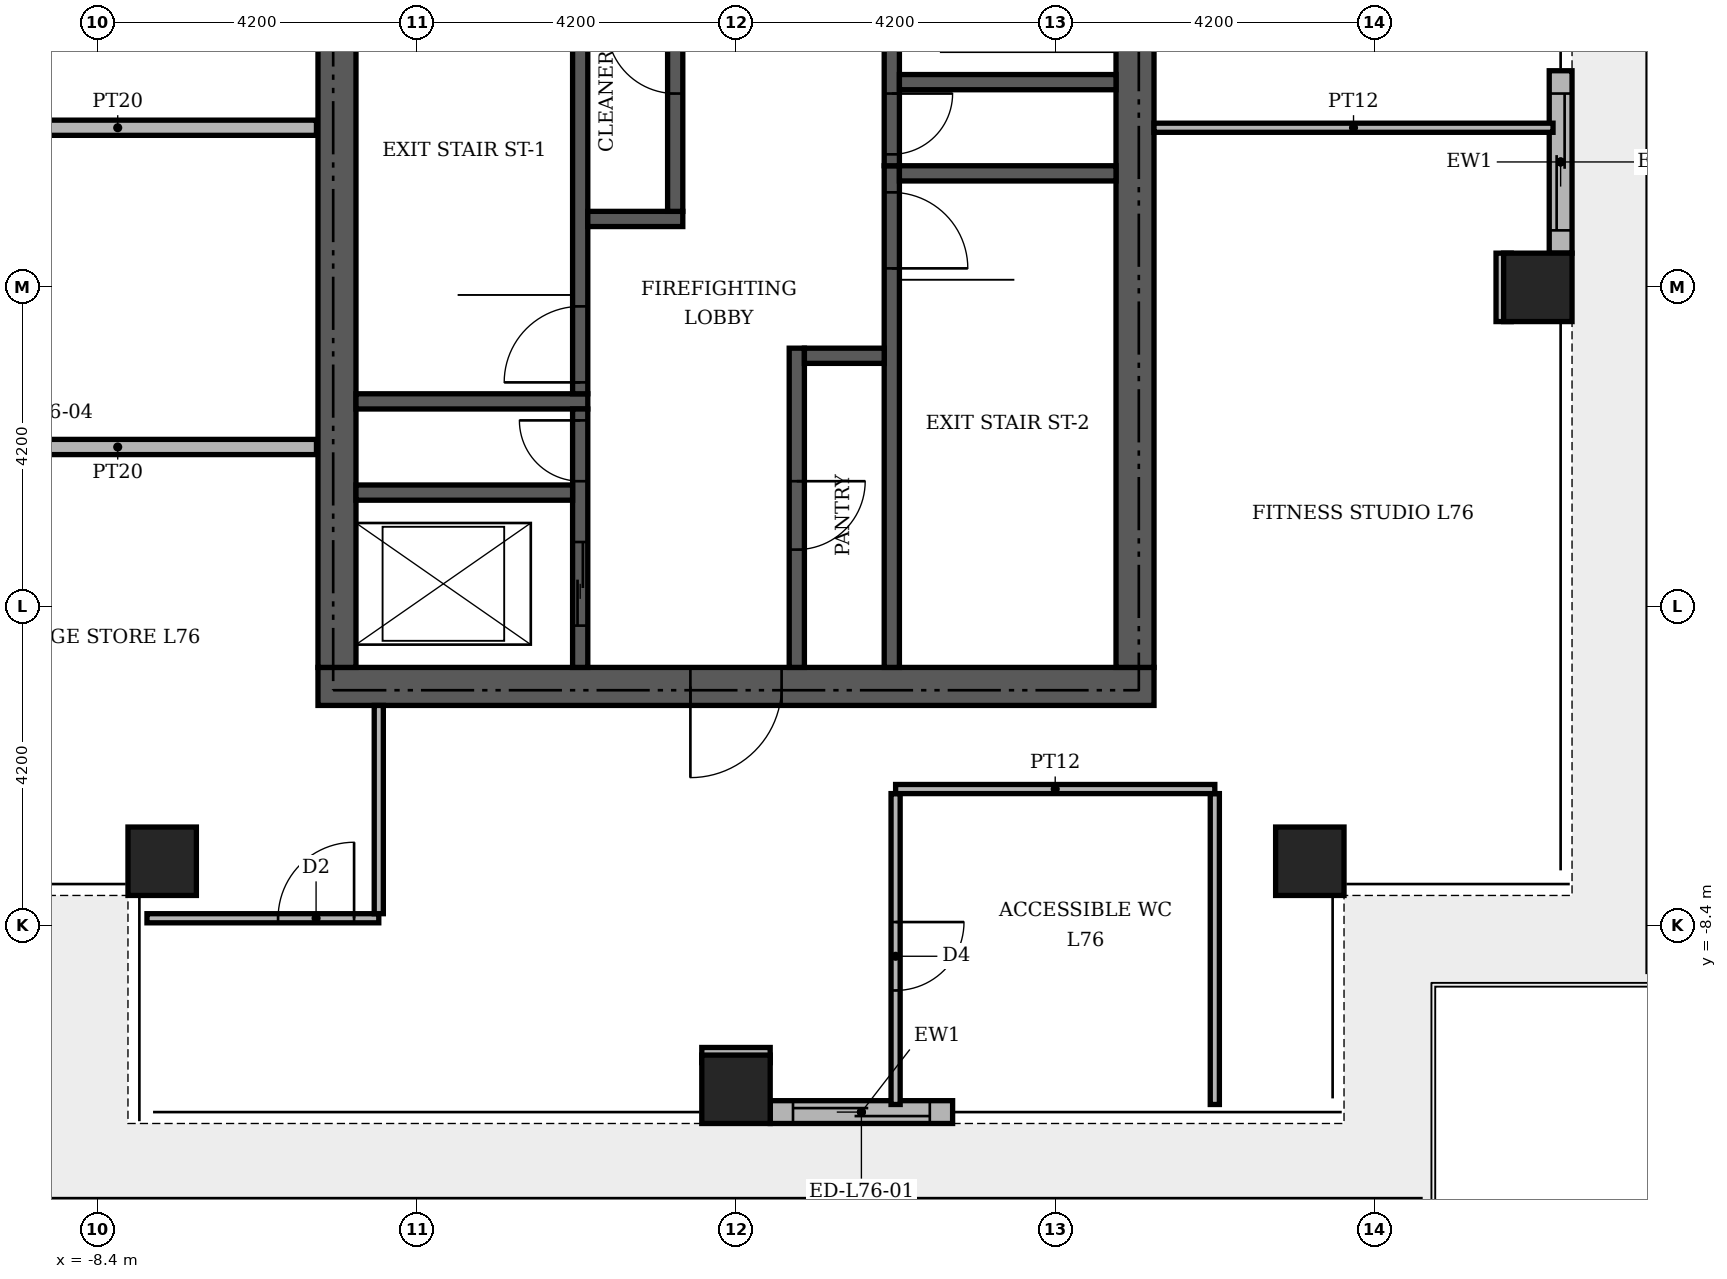
"""IFC4 building model, lengths in metres.
Left out: names, types, materials, properties, quantities, classifications, styles, units other than length and angle.
Written with IfcOpenShell. Run it as: python <this file> out.ifc"""

import sys

from ifc_helpers import new_model, si_unit, direction, frame, frame_2d, origin, origin_2d, place, context, subcontext, project, spatial, rectangle, extrude, element, fill, save


model = new_model("IFC4")
c1 = context("Model", 3, precision=1e-05, world=origin(), true_north=direction((0.0, 1.0)))
c2 = subcontext(c1, "Body", "Model", "MODEL_VIEW")
j1 = project(units=[si_unit("LENGTHUNIT", "METRE"), si_unit("PLANEANGLEUNIT", "RADIAN")], contexts=[c1])
p1 = place(None, origin())
s1 = spatial("IfcSite", under=j1, at=p1, CompositionType="ELEMENT")
p2 = place(p1, origin())
s2 = spatial("IfcBuilding", under=s1, at=p2, CompositionType="ELEMENT")
p3 = place(p2, frame((0.0, 0.0, 316.2)))
s3 = spatial("IfcBuildingStorey", under=s2, at=p3, CompositionType="ELEMENT", Elevation=316.2)
p4 = place(p3, frame((-5.5, -5.25, 0.0), z_axis=(0.0, 0.0, 1.0), x_axis=(1.0, 0.0, 0.0)))
e1 = element("IfcWall", 1, at=p4, inside=s3, PredefinedType="SHEAR", context=c2, shape_type="SweptSolid", body=[
    extrude(rectangle(XDim=11.0, YDim=0.5, at=frame_2d((5.5, 0.0))), origin(), (0.0, 0.0, 1.0), 5.0),
])
p5 = place(p4, frame((4.9, 0.0, 0.0)))
e2 = element("IfcOpeningElement", 2, at=p5, cuts=e1, PredefinedType="OPENING", context=c2, shape_type="SweptSolid", body=[
    extrude(rectangle(XDim=1.2, YDim=2.1, at=frame_2d((0.6, 1.05))), frame((0.0, 0.26, 0.0), z_axis=(0.0, -1.0, 0.0), x_axis=(1.0, 0.0, 0.0)), (0.0, 0.0, 1.0), 0.52),
])
for number, where, z_axis, x_axis in (
    (3, (-5.25, -5.0, 0.0), (0.0, 0.0, 1.0), (0.0, 1.0, 0.0)),
    (4, (5.25, -5.0, 0.0), (0.0, 0.0, 1.0), (0.0, 1.0, 0.0)),
):
    element("IfcWall", number, at=place(p3, frame(where, z_axis=z_axis, x_axis=x_axis)), inside=s3, PredefinedType="SHEAR", context=c2, shape_type="SweptSolid", body=[
        extrude(rectangle(XDim=10.5, YDim=0.5, at=frame_2d((5.25, 0.0))), origin(), (0.0, 0.0, 1.0), 5.0),
    ])
p6 = place(p3, frame((2.05, -5.0, 0.0), z_axis=(0.0, 0.0, 1.0), x_axis=(0.0, 1.0, 0.0)))
e5 = element("IfcWall", 5, at=p6, inside=s3, PredefinedType="SHEAR", context=c2, shape_type="SweptSolid", body=[
    extrude(rectangle(XDim=6.6, YDim=0.2, at=frame_2d((3.3, 0.0))), origin(), (0.0, 0.0, 1.0), 5.0),
])
p7 = place(p6, frame((5.25, 0.0, 0.0)))
e6 = element("IfcOpeningElement", 6, at=p7, cuts=e5, PredefinedType="OPENING", context=c2, shape_type="SweptSolid", body=[
    extrude(rectangle(XDim=1.0, YDim=2.1, at=frame_2d((0.5, 1.05))), frame((0.0, 0.11, 0.0), z_axis=(0.0, -1.0, 0.0), x_axis=(1.0, 0.0, 0.0)), (0.0, 0.0, 1.0), 0.22),
])
p8 = place(p3, frame((-5.0, -1.5, 0.0), z_axis=(0.0, 0.0, 1.0), x_axis=(1.0, 0.0, 0.0)))
e7 = element("IfcWall", 7, at=p8, inside=s3, PredefinedType="SHEAR", context=c2, shape_type="SweptSolid", body=[
    extrude(rectangle(XDim=3.05, YDim=0.2, at=frame_2d((1.525, 0.0))), origin(), (0.0, 0.0, 1.0), 5.0),
])
p9 = place(p3, frame((-2.05, -1.4, 0.0), z_axis=(0.0, 0.0, 1.0), x_axis=(0.0, 1.0, 0.0)))
e8 = element("IfcWall", 8, at=p9, inside=s3, PredefinedType="SHEAR", context=c2, shape_type="SweptSolid", body=[
    extrude(rectangle(XDim=6.4, YDim=0.2, at=frame_2d((3.2, 0.0))), origin(), (0.0, 0.0, 1.0), 5.0),
])
p10 = place(p9, frame((0.15, 0.0, 0.0)))
e9 = element("IfcOpeningElement", 9, at=p10, cuts=e8, PredefinedType="OPENING", context=c2, shape_type="SweptSolid", body=[
    extrude(rectangle(XDim=1.0, YDim=2.1, at=frame_2d((0.5, 1.05))), frame((0.0, 0.11, 0.0), z_axis=(0.0, -1.0, 0.0), x_axis=(1.0, 0.0, 0.0)), (0.0, 0.0, 1.0), 0.22),
])
p11 = place(p3, frame((2.15, 1.5, 0.0), z_axis=(0.0, 0.0, 1.0), x_axis=(1.0, 0.0, 0.0)))
e10 = element("IfcWall", 10, at=p11, inside=s3, PredefinedType="SHEAR", context=c2, shape_type="SweptSolid", body=[
    extrude(rectangle(XDim=2.85, YDim=0.2, at=frame_2d((1.425, 0.0))), origin(), (0.0, 0.0, 1.0), 5.0),
])
p12 = place(p3, frame((-2.05, -5.0, 0.0), z_axis=(0.0, 0.0, 1.0), x_axis=(0.0, 1.0, 0.0)))
e11 = element("IfcWall", 11, at=p12, inside=s3, PredefinedType="SHEAR", context=c2, shape_type="SweptSolid", body=[
    extrude(rectangle(XDim=3.4, YDim=0.2, at=frame_2d((1.7, 0.0))), origin(), (0.0, 0.0, 1.0), 5.0),
])
p13 = place(p12, frame((0.55, 0.0, 0.0)))
e12 = element("IfcOpeningElement", 12, at=p13, cuts=e11, PredefinedType="OPENING", context=c2, shape_type="SweptSolid", body=[
    extrude(rectangle(XDim=1.1, YDim=2.1, at=frame_2d((0.55, 1.05))), frame((0.0, 0.11, 0.0), z_axis=(0.0, -1.0, 0.0), x_axis=(1.0, 0.0, 0.0)), (0.0, 0.0, 1.0), 0.22),
])
p14 = place(p12, frame((2.45, 0.0, 0.0)))
e13 = element("IfcOpeningElement", 13, at=p14, cuts=e11, PredefinedType="OPENING", context=c2, shape_type="SweptSolid", body=[
    extrude(rectangle(XDim=0.8, YDim=2.1, at=frame_2d((0.4, 1.05))), frame((0.0, 0.11, 0.0), z_axis=(0.0, -1.0, 0.0), x_axis=(1.0, 0.0, 0.0)), (0.0, 0.0, 1.0), 0.22),
])
p15 = place(p3, frame((0.8, -5.0, 0.0), z_axis=(0.0, 0.0, 1.0), x_axis=(0.0, 1.0, 0.0)))
e14 = element("IfcWall", 14, at=p15, inside=s3, PredefinedType="SHEAR", context=c2, shape_type="SweptSolid", body=[
    extrude(rectangle(XDim=4.2, YDim=0.2, at=frame_2d((2.1, 0.0))), origin(), (0.0, 0.0, 1.0), 5.0),
])
p16 = place(p15, frame((1.55, 0.0, 0.0)))
e15 = element("IfcOpeningElement", 15, at=p16, cuts=e14, PredefinedType="OPENING", context=c2, shape_type="SweptSolid", body=[
    extrude(rectangle(XDim=0.9, YDim=2.1, at=frame_2d((0.45, 1.05))), frame((0.0, 0.11, 0.0), z_axis=(0.0, -1.0, 0.0), x_axis=(1.0, 0.0, 0.0)), (0.0, 0.0, 1.0), 0.22),
])
p17 = place(p3, frame((-5.0, -2.7, 0.0), z_axis=(0.0, 0.0, 1.0), x_axis=(1.0, 0.0, 0.0)))
e16 = element("IfcWall", 16, at=p17, inside=s3, PredefinedType="SHEAR", context=c2, shape_type="SweptSolid", body=[
    extrude(rectangle(XDim=2.85, YDim=0.2, at=frame_2d((1.425, 0.0))), origin(), (0.0, 0.0, 1.0), 5.0),
])
p18 = place(p3, frame((0.9, -0.9, 0.0), z_axis=(0.0, 0.0, 1.0), x_axis=(1.0, 0.0, 0.0)))
e17 = element("IfcWall", 17, at=p18, inside=s3, PredefinedType="SHEAR", context=c2, shape_type="SweptSolid", body=[
    extrude(rectangle(XDim=1.05, YDim=0.2, at=frame_2d((0.525, 0.0))), origin(), (0.0, 0.0, 1.0), 5.0),
])
p19 = place(p3, frame((-1.95, 0.9, 0.0), z_axis=(0.0, 0.0, 1.0), x_axis=(1.0, 0.0, 0.0)))
e18 = element("IfcWall", 18, at=p19, inside=s3, PredefinedType="SHEAR", context=c2, shape_type="SweptSolid", body=[
    extrude(rectangle(XDim=1.25, YDim=0.2, at=frame_2d((0.625, 0.0))), origin(), (0.0, 0.0, 1.0), 5.0),
])
p20 = place(p3, frame((-0.8, 1.0, 0.0), z_axis=(0.0, 0.0, 1.0), x_axis=(0.0, 1.0, 0.0)))
e19 = element("IfcWall", 19, at=p20, inside=s3, PredefinedType="SHEAR", context=c2, shape_type="SweptSolid", body=[
    extrude(rectangle(XDim=4.0, YDim=0.2, at=frame_2d((2.0, 0.0))), origin(), (0.0, 0.0, 1.0), 5.0),
])
p21 = place(p20, frame((1.55, 0.0, 0.0)))
e20 = element("IfcOpeningElement", 20, at=p21, cuts=e19, PredefinedType="OPENING", context=c2, shape_type="SweptSolid", body=[
    extrude(rectangle(XDim=0.9, YDim=2.1, at=frame_2d((0.45, 1.05))), frame((0.0, 0.11, 0.0), z_axis=(0.0, -1.0, 0.0), x_axis=(1.0, 0.0, 0.0)), (0.0, 0.0, 1.0), 0.22),
])
p22 = place(p3, frame((2.05, 1.6, 0.0), z_axis=(0.0, 0.0, 1.0), x_axis=(0.0, 1.0, 0.0)))
e21 = element("IfcWall", 21, at=p22, inside=s3, PredefinedType="SHEAR", context=c2, shape_type="SweptSolid", body=[
    extrude(rectangle(XDim=3.4, YDim=0.2, at=frame_2d((1.7, 0.0))), origin(), (0.0, 0.0, 1.0), 5.0),
])
p23 = place(p22, frame((1.75, 0.0, 0.0)))
e22 = element("IfcOpeningElement", 22, at=p23, cuts=e21, PredefinedType="OPENING", context=c2, shape_type="SweptSolid", body=[
    extrude(rectangle(XDim=1.1, YDim=2.1, at=frame_2d((0.55, 1.05))), frame((0.0, 0.11, 0.0), z_axis=(0.0, -1.0, 0.0), x_axis=(1.0, 0.0, 0.0)), (0.0, 0.0, 1.0), 0.22),
])
p24 = place(p22, frame((0.15, 0.0, 0.0)))
e23 = element("IfcOpeningElement", 23, at=p24, cuts=e21, PredefinedType="OPENING", context=c2, shape_type="SweptSolid", body=[
    extrude(rectangle(XDim=0.8, YDim=2.1, at=frame_2d((0.4, 1.05))), frame((0.0, 0.11, 0.0), z_axis=(0.0, -1.0, 0.0), x_axis=(1.0, 0.0, 0.0)), (0.0, 0.0, 1.0), 0.22),
])
p25 = place(p3, frame((2.15, 2.7, 0.0), z_axis=(0.0, 0.0, 1.0), x_axis=(1.0, 0.0, 0.0)))
e24 = element("IfcWall", 24, at=p25, inside=s3, PredefinedType="SHEAR", context=c2, shape_type="SweptSolid", body=[
    extrude(rectangle(XDim=2.85, YDim=0.2, at=frame_2d((1.425, 0.0))), origin(), (0.0, 0.0, 1.0), 5.0),
])
for number, where, z_axis, x_axis in (
    (25, (10.55, 0.0, -0.35), (0.0, 0.0, 1.0), (1.0, 0.0, 0.0)),
    (26, (7.55, -7.55, -0.35), (0.0, 0.0, 1.0), (1.0, 0.0, 0.0)),
    (27, (0.0, -10.55, -0.35), (0.0, 0.0, 1.0), (1.0, 0.0, 0.0)),
    (28, (-7.55, -7.55, -0.35), (0.0, 0.0, 1.0), (1.0, 0.0, 0.0)),
):
    element("IfcColumn", number, at=place(p3, frame(where, z_axis=z_axis, x_axis=x_axis)), inside=s3, PredefinedType="COLUMN", context=c2, shape_type="SweptSolid", body=[
        extrude(rectangle(XDim=0.9, YDim=0.9, at=origin_2d()), origin(), (0.0, 0.0, 1.0), 5.75),
    ])
p26 = place(p3, frame((0.45, -10.85, 0.0), z_axis=(0.0, 0.0, 1.0), x_axis=(1.0, 0.0, 0.0)))
e29 = element("IfcWall", 29, at=p26, inside=s3, PredefinedType="STANDARD", context=c2, shape_type="SweptSolid", body=[
    extrude(rectangle(XDim=2.4, YDim=0.3, at=frame_2d((1.2, 0.0))), origin(), (0.0, 0.0, 1.0), 5.0),
])
p27 = place(p26, frame((0.3, 0.0, 0.0)))
e30 = element("IfcOpeningElement", 30, at=p27, cuts=e29, PredefinedType="OPENING", context=c2, shape_type="SweptSolid", body=[
    extrude(rectangle(XDim=1.8, YDim=2.4, at=frame_2d((0.9, 1.2))), frame((0.0, 0.16, 0.0), z_axis=(0.0, -1.0, 0.0), x_axis=(1.0, 0.0, 0.0)), (0.0, 0.0, 1.0), 0.32),
])
p28 = place(p3, frame((10.85, 0.45, 0.0), z_axis=(0.0, 0.0, 1.0), x_axis=(0.0, 1.0, 0.0)))
e31 = element("IfcWall", 31, at=p28, inside=s3, PredefinedType="STANDARD", context=c2, shape_type="SweptSolid", body=[
    extrude(rectangle(XDim=2.4, YDim=0.3, at=frame_2d((1.2, 0.0))), origin(), (0.0, 0.0, 1.0), 5.0),
])
p29 = place(p28, frame((0.3, 0.0, 0.0)))
e32 = element("IfcOpeningElement", 32, at=p29, cuts=e31, PredefinedType="OPENING", context=c2, shape_type="SweptSolid", body=[
    extrude(rectangle(XDim=1.8, YDim=2.4, at=frame_2d((0.9, 1.2))), frame((0.0, 0.16, 0.0), z_axis=(0.0, -1.0, 0.0), x_axis=(1.0, 0.0, 0.0)), (0.0, 0.0, 1.0), 0.32),
])
p30 = place(p3, frame((2.1, -10.75, 0.0), z_axis=(0.0, 0.0, 1.0), x_axis=(0.0, 1.0, 0.0)))
e33 = element("IfcWall", 33, at=p30, inside=s3, PredefinedType="PARTITIONING", context=c2, shape_type="SweptSolid", body=[
    extrude(rectangle(XDim=4.09, YDim=0.12, at=frame_2d((2.045, 0.0))), origin(), (0.0, 0.0, 1.0), 5.0),
])
p31 = place(p30, frame((1.5, 0.0, 0.0)))
e34 = element("IfcOpeningElement", 34, at=p31, cuts=e33, PredefinedType="OPENING", context=c2, shape_type="SweptSolid", body=[
    extrude(rectangle(XDim=0.9, YDim=2.1, at=frame_2d((0.45, 1.05))), frame((0.0, 0.07, 0.0), z_axis=(0.0, -1.0, 0.0), x_axis=(1.0, 0.0, 0.0)), (0.0, 0.0, 1.0), 0.14),
])
p32 = place(p3, frame((6.3, -10.75, 0.0), z_axis=(0.0, 0.0, 1.0), x_axis=(0.0, 1.0, 0.0)))
e35 = element("IfcWall", 35, at=p32, inside=s3, PredefinedType="PARTITIONING", context=c2, shape_type="SweptSolid", body=[
    extrude(rectangle(XDim=4.09, YDim=0.12, at=frame_2d((2.045, 0.0))), origin(), (0.0, 0.0, 1.0), 5.0),
])
p33 = place(p3, frame((-0.45, -10.1, 0.0), z_axis=(0.0, 0.0, 1.0), x_axis=(1.0, 0.0, 0.0)))
e36 = element("IfcWall", 36, at=p33, inside=s3, PredefinedType="PARTITIONING", context=c2, shape_type="SweptSolid", body=[
    extrude(rectangle(XDim=0.9, YDim=0.2, at=frame_2d((0.45, 0.0))), origin(), (0.0, 0.0, 1.0), 5.0),
])
p34 = place(p3, frame((-7.75, -8.3, 0.0), z_axis=(0.0, 0.0, 1.0), x_axis=(1.0, 0.0, 0.0)))
e37 = element("IfcWall", 37, at=p34, inside=s3, PredefinedType="PARTITIONING", context=c2, shape_type="SweptSolid", body=[
    extrude(rectangle(XDim=3.05, YDim=0.12, at=frame_2d((1.525, 0.0))), origin(), (0.0, 0.0, 1.0), 5.0),
])
p35 = place(p34, frame((1.725, 0.0, 0.0)))
e38 = element("IfcOpeningElement", 38, at=p35, cuts=e37, PredefinedType="OPENING", context=c2, shape_type="SweptSolid", body=[
    extrude(rectangle(XDim=1.0, YDim=2.1, at=frame_2d((0.5, 1.05))), frame((0.0, 0.07, 0.0), z_axis=(0.0, -1.0, 0.0), x_axis=(1.0, 0.0, 0.0)), (0.0, 0.0, 1.0), 0.14),
])
p36 = place(p3, frame((-4.7, -8.24, 0.0), z_axis=(0.0, 0.0, 1.0), x_axis=(0.0, 1.0, 0.0)))
e39 = element("IfcWall", 39, at=p36, inside=s3, PredefinedType="PARTITIONING", context=c2, shape_type="SweptSolid", body=[
    extrude(rectangle(XDim=2.74, YDim=0.12, at=frame_2d((1.37, 0.0))), origin(), (0.0, 0.0, 1.0), 5.0),
])
p37 = place(p3, frame((2.1, -6.6, 0.0), z_axis=(0.0, 0.0, 1.0), x_axis=(1.0, 0.0, 0.0)))
e40 = element("IfcWall", 40, at=p37, inside=s3, PredefinedType="PARTITIONING", context=c2, shape_type="SweptSolid", body=[
    extrude(rectangle(XDim=4.2, YDim=0.12, at=frame_2d((2.1, 0.0))), origin(), (0.0, 0.0, 1.0), 5.0),
])
p38 = place(p3, frame((-10.75, -2.1, 0.0), z_axis=(0.0, 0.0, 1.0), x_axis=(1.0, 0.0, 0.0)))
e41 = element("IfcWall", 41, at=p38, inside=s3, PredefinedType="PARTITIONING", context=c2, shape_type="SweptSolid", body=[
    extrude(rectangle(XDim=5.23, YDim=0.2, at=frame_2d((2.615, 0.0))), origin(), (0.0, 0.0, 1.0), 5.0),
])
p39 = place(p3, frame((10.1, -0.45, 0.0), z_axis=(0.0, 0.0, 1.0), x_axis=(0.0, 1.0, 0.0)))
e42 = element("IfcWall", 42, at=p39, inside=s3, PredefinedType="PARTITIONING", context=c2, shape_type="SweptSolid", body=[
    extrude(rectangle(XDim=0.9, YDim=0.2, at=frame_2d((0.45, 0.0))), origin(), (0.0, 0.0, 1.0), 5.0),
])
p40 = place(p3, frame((-10.75, 2.1, 0.0), z_axis=(0.0, 0.0, 1.0), x_axis=(1.0, 0.0, 0.0)))
e43 = element("IfcWall", 43, at=p40, inside=s3, PredefinedType="PARTITIONING", context=c2, shape_type="SweptSolid", body=[
    extrude(rectangle(XDim=5.23, YDim=0.2, at=frame_2d((2.615, 0.0))), origin(), (0.0, 0.0, 1.0), 5.0),
])
p41 = place(p3, frame((5.5, 2.1, 0.0), z_axis=(0.0, 0.0, 1.0), x_axis=(1.0, 0.0, 0.0)))
e44 = element("IfcWall", 44, at=p41, inside=s3, PredefinedType="PARTITIONING", context=c2, shape_type="SweptSolid", body=[
    extrude(rectangle(XDim=5.25, YDim=0.12, at=frame_2d((2.625, 0.0))), origin(), (0.0, 0.0, 1.0), 5.0),
])
p42 = place(p27, origin())
e45 = element("IfcDoor", 45, at=p42, inside=s3, OperationType="SLIDING_TO_LEFT", PredefinedType="DOOR", context=c2, shape_type="SweptSolid", body=[
    extrude(rectangle(XDim=1.8, YDim=2.4, at=frame_2d((0.9, 1.2))), frame((0.0, 0.025, 0.0), z_axis=(0.0, -1.0, 0.0), x_axis=(1.0, 0.0, 0.0)), (0.0, 0.0, 1.0), 0.05),
])
fill(e30, e45)
p43 = place(p29, origin())
e46 = element("IfcDoor", 46, at=p43, inside=s3, OperationType="SLIDING_TO_LEFT", PredefinedType="DOOR", context=c2, shape_type="SweptSolid", body=[
    extrude(rectangle(XDim=1.8, YDim=2.4, at=frame_2d((0.9, 1.2))), frame((0.0, 0.025, 0.0), z_axis=(0.0, -1.0, 0.0), x_axis=(1.0, 0.0, 0.0)), (0.0, 0.0, 1.0), 0.05),
])
fill(e32, e46)
p44 = place(p13, origin())
e47 = element("IfcDoor", 47, at=p44, inside=s3, OperationType="SLIDING_TO_LEFT", PredefinedType="DOOR", context=c2, shape_type="SweptSolid", body=[
    extrude(rectangle(XDim=1.1, YDim=2.1, at=frame_2d((0.55, 1.05))), frame((0.0, 0.025, 0.0), z_axis=(0.0, -1.0, 0.0), x_axis=(1.0, 0.0, 0.0)), (0.0, 0.0, 1.0), 0.05),
])
fill(e12, e47)
p45 = place(p10, origin())
e48 = element("IfcDoor", 48, at=p45, inside=s3, OperationType="SINGLE_SWING_LEFT", PredefinedType="DOOR", context=c2, shape_type="SweptSolid", body=[
    extrude(rectangle(XDim=1.0, YDim=2.1, at=frame_2d((0.5, 1.05))), frame((0.0, 0.025, 0.0), z_axis=(0.0, -1.0, 0.0), x_axis=(1.0, 0.0, 0.0)), (0.0, 0.0, 1.0), 0.05),
])
fill(e9, e48)
p46 = place(p7, frame((1.0, 0.0, 0.0), z_axis=(0.0, 0.0, 1.0), x_axis=(-1.0, 0.0, 0.0)))
e49 = element("IfcDoor", 49, at=p46, inside=s3, OperationType="SINGLE_SWING_LEFT", PredefinedType="DOOR", context=c2, shape_type="SweptSolid", body=[
    extrude(rectangle(XDim=1.0, YDim=2.1, at=frame_2d((0.5, 1.05))), frame((0.0, 0.025, 0.0), z_axis=(0.0, -1.0, 0.0), x_axis=(1.0, 0.0, 0.0)), (0.0, 0.0, 1.0), 0.05),
])
fill(e6, e49)
p47 = place(p24, frame((0.8, 0.0, 0.0), z_axis=(0.0, 0.0, 1.0), x_axis=(-1.0, 0.0, 0.0)))
e50 = element("IfcDoor", 50, at=p47, inside=s3, OperationType="SINGLE_SWING_RIGHT", PredefinedType="DOOR", context=c2, shape_type="SweptSolid", body=[
    extrude(rectangle(XDim=0.8, YDim=2.1, at=frame_2d((0.4, 1.05))), frame((0.0, 0.025, 0.0), z_axis=(0.0, -1.0, 0.0), x_axis=(1.0, 0.0, 0.0)), (0.0, 0.0, 1.0), 0.05),
])
fill(e23, e50)
p48 = place(p14, origin())
e51 = element("IfcDoor", 51, at=p48, inside=s3, OperationType="SINGLE_SWING_RIGHT", PredefinedType="DOOR", context=c2, shape_type="SweptSolid", body=[
    extrude(rectangle(XDim=0.8, YDim=2.1, at=frame_2d((0.4, 1.05))), frame((0.0, 0.025, 0.0), z_axis=(0.0, -1.0, 0.0), x_axis=(1.0, 0.0, 0.0)), (0.0, 0.0, 1.0), 0.05),
])
fill(e13, e51)
p49 = place(p21, origin())
e52 = element("IfcDoor", 52, at=p49, inside=s3, OperationType="SINGLE_SWING_RIGHT", PredefinedType="DOOR", context=c2, shape_type="SweptSolid", body=[
    extrude(rectangle(XDim=0.9, YDim=2.1, at=frame_2d((0.45, 1.05))), frame((0.0, 0.025, 0.0), z_axis=(0.0, -1.0, 0.0), x_axis=(1.0, 0.0, 0.0)), (0.0, 0.0, 1.0), 0.05),
])
fill(e20, e52)
p50 = place(p16, frame((0.9, 0.0, 0.0), z_axis=(0.0, 0.0, 1.0), x_axis=(-1.0, 0.0, 0.0)))
e53 = element("IfcDoor", 53, at=p50, inside=s3, OperationType="SINGLE_SWING_RIGHT", PredefinedType="DOOR", context=c2, shape_type="SweptSolid", body=[
    extrude(rectangle(XDim=0.9, YDim=2.1, at=frame_2d((0.45, 1.05))), frame((0.0, 0.025, 0.0), z_axis=(0.0, -1.0, 0.0), x_axis=(1.0, 0.0, 0.0)), (0.0, 0.0, 1.0), 0.05),
])
fill(e15, e53)
p51 = place(p5, frame((1.2, 0.0, 0.0), z_axis=(0.0, 0.0, 1.0), x_axis=(-1.0, 0.0, 0.0)))
e54 = element("IfcDoor", 54, at=p51, inside=s3, OperationType="SINGLE_SWING_LEFT", PredefinedType="DOOR", context=c2, shape_type="SweptSolid", body=[
    extrude(rectangle(XDim=1.2, YDim=2.1, at=frame_2d((0.6, 1.05))), frame((0.0, 0.025, 0.0), z_axis=(0.0, -1.0, 0.0), x_axis=(1.0, 0.0, 0.0)), (0.0, 0.0, 1.0), 0.05),
])
fill(e2, e54)
p52 = place(p31, frame((0.9, 0.0, 0.0), z_axis=(0.0, 0.0, 1.0), x_axis=(-1.0, 0.0, 0.0)))
e55 = element("IfcDoor", 55, at=p52, inside=s3, OperationType="SINGLE_SWING_RIGHT", PredefinedType="DOOR", context=c2, shape_type="SweptSolid", body=[
    extrude(rectangle(XDim=0.9, YDim=2.1, at=frame_2d((0.45, 1.05))), frame((0.0, 0.025, 0.0), z_axis=(0.0, -1.0, 0.0), x_axis=(1.0, 0.0, 0.0)), (0.0, 0.0, 1.0), 0.05),
])
fill(e34, e55)
p53 = place(p35, origin())
e56 = element("IfcDoor", 56, at=p53, inside=s3, OperationType="SINGLE_SWING_RIGHT", PredefinedType="DOOR", context=c2, shape_type="SweptSolid", body=[
    extrude(rectangle(XDim=1.0, YDim=2.1, at=frame_2d((0.5, 1.05))), frame((0.0, 0.025, 0.0), z_axis=(0.0, -1.0, 0.0), x_axis=(1.0, 0.0, 0.0)), (0.0, 0.0, 1.0), 0.05),
])
fill(e38, e56)
save(model, sys.argv[1])
